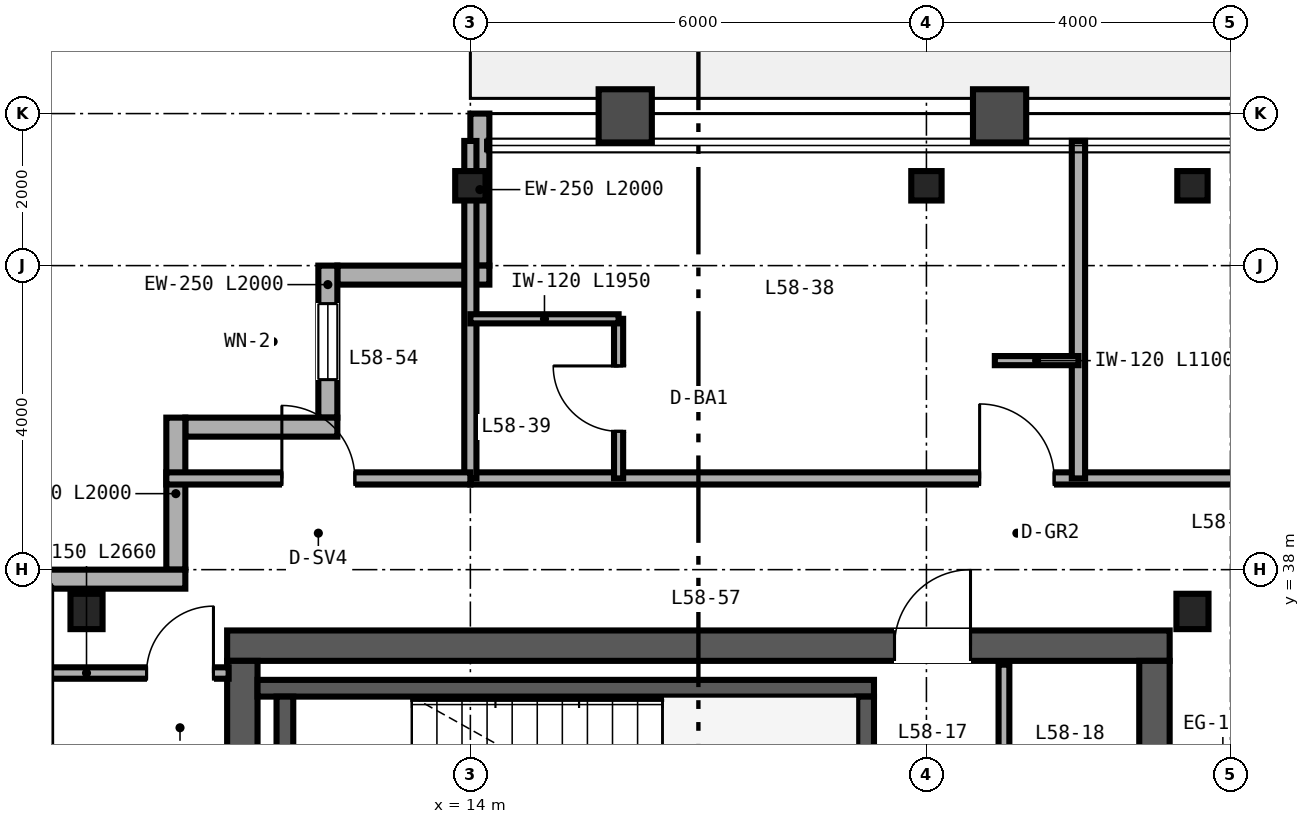
"""IFC4 building model, lengths in metres.
Left out: names, types, materials, properties, quantities, classifications, styles, units other than length and angle.
Written with IfcOpenShell. Run it as: python <this file> out.ifc"""

import sys

from ifc_helpers import new_model, si_unit, direction, frame, frame_2d, origin, origin_2d, place, context, subcontext, project, spatial, rectangle, i_section, extrude, source, transform, mapped, element, fill, save


model = new_model("IFC4")
c1 = context("Model", 3, precision=1e-05, world=origin(), true_north=direction((0.0, 1.0)))
c2 = subcontext(c1, "Body", "Model", "MODEL_VIEW")
j1 = project(units=[si_unit("LENGTHUNIT", "METRE"), si_unit("PLANEANGLEUNIT", "RADIAN")], contexts=[c1])
p1 = place(None, origin())
s1 = spatial("IfcSite", under=j1, at=p1, CompositionType="ELEMENT")
p2 = place(p1, origin())
s2 = spatial("IfcBuilding", under=s1, at=p2, CompositionType="ELEMENT")
p3 = place(p2, frame((0.0, 0.0, 232.8)))
s3 = spatial("IfcBuildingStorey", under=s2, at=p3, CompositionType="ELEMENT", Elevation=232.8)
p4 = place(p3, frame((10.8, 37.0, 0.0), z_axis=(0.0, 0.0, 1.0), x_axis=(1.0, 0.0, 0.0)))
e1 = element("IfcWall", 1, at=p4, inside=s3, PredefinedType="SHEAR", context=c2, shape_type="SweptSolid", body=[
    extrude(rectangle(XDim=12.4, YDim=0.4, at=frame_2d((6.2, 0.0))), origin(), (0.0, 0.0, 1.0), 3.38),
])
p5 = place(p4, frame((8.78, 0.0, 0.0)))
e2 = element("IfcOpeningElement", 2, at=p5, cuts=e1, PredefinedType="OPENING", context=c2, shape_type="SweptSolid", body=[
    extrude(rectangle(XDim=1.0, YDim=2.15, at=frame_2d((0.5, 1.075))), frame((0.0, 0.21, 0.0), z_axis=(0.0, -1.0, 0.0), x_axis=(1.0, 0.0, 0.0)), (0.0, 0.0, 1.0), 0.42),
])
for number, where, z_axis, x_axis in (
    (3, (11.0, 15.2, 0.0), (0.0, 0.0, 1.0), (0.0, 1.0, 0.0)),
    (4, (23.0, 15.2, 0.0), (0.0, 0.0, 1.0), (0.0, 1.0, 0.0)),
):
    element("IfcWall", number, at=place(p3, frame(where, z_axis=z_axis, x_axis=x_axis)), inside=s3, PredefinedType="SHEAR", context=c2, shape_type="SweptSolid", body=[
        extrude(rectangle(XDim=21.6, YDim=0.4, at=frame_2d((10.8, 0.0))), origin(), (0.0, 0.0, 1.0), 3.38),
    ])
p6 = place(p3, frame((11.2, 36.44, 0.0), z_axis=(0.0, 0.0, 1.0), x_axis=(1.0, 0.0, 0.0)))
e5 = element("IfcWall", 5, at=p6, inside=s3, PredefinedType="SHEAR", context=c2, shape_type="SweptSolid", body=[
    extrude(rectangle(XDim=8.11, YDim=0.22, at=frame_2d((4.055, 0.0))), origin(), (0.0, 0.0, 1.0), 3.4),
])
for number, where, z_axis, x_axis in (
    (6, (11.56, 33.05, 0.0), (0.0, 0.0, 1.0), (0.0, 1.0, 0.0)),
    (7, (19.2, 33.05, 0.0), (0.0, 0.0, 1.0), (0.0, 1.0, 0.0)),
):
    element("IfcWall", number, at=place(p3, frame(where, z_axis=z_axis, x_axis=x_axis)), inside=s3, PredefinedType="SHEAR", context=c2, shape_type="SweptSolid", body=[
        extrude(rectangle(XDim=3.28, YDim=0.22, at=frame_2d((1.64, 0.0))), origin(), (0.0, 0.0, 1.0), 3.4),
    ])
m1 = source(origin(), c2, "Body", "SweptSolid", [
    extrude(i_section(OverallWidth=0.422, OverallDepth=0.465, WebThickness=0.045, FlangeThickness=0.073, FilletRadius=0.025, at=origin_2d()), origin(), (0.0, 0.0, 1.0), 3.38),
])
for number, where, z_axis, x_axis in (
    (8, (8.95, 37.45, 0.0), (0.0, 0.0, 1.0), (1.0, 0.0, 0.0)),
    (9, (23.5, 37.45, 0.0), (0.0, 0.0, 1.0), (1.0, 0.0, 0.0)),
):
    element("IfcColumn", number, at=place(p3, frame(where, z_axis=z_axis, x_axis=x_axis)), inside=s3, PredefinedType="COLUMN", context=c2, shape_type="MappedRepresentation", body=[
        mapped(m1, transform((0.0, 0.0, 0.0), scale=1.0)),
    ])
m2 = source(origin(), c2, "Body", "SweptSolid", [
    extrude(i_section(OverallWidth=0.399, OverallDepth=0.387, WebThickness=0.021, FlangeThickness=0.033, FilletRadius=0.025, at=origin_2d()), origin(), (0.0, 0.0, 1.0), 3.38),
])
for number, where, z_axis, x_axis in (
    (10, (14.0, 43.05, 0.0), (0.0, 0.0, 1.0), (1.0, 0.0, 0.0)),
    (11, (20.0, 43.05, 0.0), (0.0, 0.0, 1.0), (1.0, 0.0, 0.0)),
    (12, (23.5, 43.05, 0.0), (0.0, 0.0, 1.0), (1.0, 0.0, 0.0)),
):
    element("IfcColumn", number, at=place(p3, frame(where, z_axis=z_axis, x_axis=x_axis)), inside=s3, PredefinedType="COLUMN", context=c2, shape_type="MappedRepresentation", body=[
        mapped(m2, transform((0.0, 0.0, 0.0), scale=1.0)),
    ])
p7 = place(p3, frame((14.125, 44.0, 0.0), z_axis=(0.0, 0.0, 1.0), x_axis=(0.0, -1.0, 0.0)))
e13 = element("IfcWall", 13, at=p7, inside=s3, PredefinedType="SOLIDWALL", context=c2, shape_type="SweptSolid", body=[
    extrude(rectangle(XDim=2.0, YDim=0.25, at=frame_2d((1.0, 0.0))), origin(), (0.0, 0.0, 1.0), 2.687),
])
p8 = place(p3, frame((14.25, 41.875, 0.0), z_axis=(0.0, 0.0, 1.0), x_axis=(-1.0, 0.0, 0.0)))
e14 = element("IfcWall", 14, at=p8, inside=s3, PredefinedType="SOLIDWALL", context=c2, shape_type="SweptSolid", body=[
    extrude(rectangle(XDim=2.0, YDim=0.25, at=frame_2d((1.0, 0.0))), origin(), (0.0, 0.0, 1.0), 3.38),
])
p9 = place(p3, frame((12.125, 42.0, 0.0), z_axis=(0.0, 0.0, 1.0), x_axis=(0.0, -1.0, 0.0)))
e15 = element("IfcWall", 15, at=p9, inside=s3, PredefinedType="SOLIDWALL", context=c2, shape_type="SweptSolid", body=[
    extrude(rectangle(XDim=2.0, YDim=0.25, at=frame_2d((1.0, 0.0))), origin(), (0.0, 0.0, 1.0), 3.38),
])
p10 = place(p9, frame((0.5, 0.0, 0.85)))
e16 = element("IfcOpeningElement", 16, at=p10, cuts=e15, PredefinedType="OPENING", context=c2, shape_type="SweptSolid", body=[
    extrude(rectangle(XDim=1.0, YDim=1.9, at=frame_2d((0.5, 0.95))), frame((0.0, 0.135, 0.0), z_axis=(0.0, -1.0, 0.0), x_axis=(1.0, 0.0, 0.0)), (0.0, 0.0, 1.0), 0.27),
])
for number, where, z_axis, x_axis in (
    (17, (12.25, 39.875, 0.0), (0.0, 0.0, 1.0), (-1.0, 0.0, 0.0)),
    (18, (10.125, 40.0, 0.0), (0.0, 0.0, 1.0), (0.0, -1.0, 0.0)),
):
    element("IfcWall", number, at=place(p3, frame(where, z_axis=z_axis, x_axis=x_axis)), inside=s3, PredefinedType="SOLIDWALL", context=c2, shape_type="SweptSolid", body=[
        extrude(rectangle(XDim=2.0, YDim=0.25, at=frame_2d((1.0, 0.0))), origin(), (0.0, 0.0, 1.0), 3.38),
    ])
p11 = place(p3, frame((10.25, 37.875, 0.0), z_axis=(0.0, 0.0, 1.0), x_axis=(-1.0, 0.0, 0.0)))
e19 = element("IfcWall", 19, at=p11, inside=s3, PredefinedType="SOLIDWALL", context=c2, shape_type="SweptSolid", body=[
    extrude(rectangle(XDim=2.25, YDim=0.25, at=frame_2d((1.125, 0.0))), origin(), (0.0, 0.0, 1.0), 3.38),
])
p12 = place(p3, frame((21.02, 33.28, 0.0), z_axis=(0.0, 0.0, 1.0), x_axis=(0.0, 1.0, 0.0)))
e20 = element("IfcWall", 20, at=p12, inside=s3, PredefinedType="PARTITIONING", context=c2, shape_type="SweptSolid", body=[
    extrude(rectangle(XDim=3.47, YDim=0.142, at=frame_2d((1.735, 0.0))), origin(), (0.0, 0.0, 1.0), 3.38),
])
p13 = place(p12, frame((1.15, 0.0, 0.0)))
e21 = element("IfcOpeningElement", 21, at=p13, cuts=e20, PredefinedType="OPENING", context=c2, shape_type="SweptSolid", body=[
    extrude(rectangle(XDim=0.84, YDim=2.1, at=frame_2d((0.42, 1.05))), frame((0.0, 0.081, 0.0), z_axis=(0.0, -1.0, 0.0), x_axis=(1.0, 0.0, 0.0)), (0.0, 0.0, 1.0), 0.162),
])
p14 = place(p3, frame((14.0, 39.2, 0.0), z_axis=(0.0, 0.0, 1.0), x_axis=(1.0, 0.0, 0.0)))
e22 = element("IfcWall", 22, at=p14, inside=s3, PredefinedType="PARTITIONING", context=c2, shape_type="SweptSolid", body=[
    extrude(rectangle(XDim=36.0, YDim=0.16, at=frame_2d((18.0, 0.0))), origin(), (0.0, 0.0, 1.0), 2.923),
])
p15 = place(p14, frame((6.7, 0.0, 0.0)))
e23 = element("IfcOpeningElement", 23, at=p15, cuts=e22, PredefinedType="OPENING", context=c2, shape_type="SweptSolid", body=[
    extrude(rectangle(XDim=0.98, YDim=2.2, at=frame_2d((0.49, 1.1))), frame((0.0, 0.09, 0.0), z_axis=(0.0, -1.0, 0.0), x_axis=(1.0, 0.0, 0.0)), (0.0, 0.0, 1.0), 0.18),
])
p16 = place(p14, frame((12.02, 0.0, 0.0)))
e24 = element("IfcOpeningElement", 24, at=p16, cuts=e22, PredefinedType="OPENING", context=c2, shape_type="SweptSolid", body=[
    extrude(rectangle(XDim=0.96, YDim=2.15, at=frame_2d((0.48, 1.075))), frame((0.0, 0.09, 0.0), z_axis=(0.0, -1.0, 0.0), x_axis=(1.0, 0.0, 0.0)), (0.0, 0.0, 1.0), 0.18),
])
p17 = place(p14, frame((25.2, 0.0, 0.0)))
e25 = element("IfcOpeningElement", 25, at=p17, cuts=e22, PredefinedType="OPENING", context=c2, shape_type="SweptSolid", body=[
    extrude(rectangle(XDim=0.98, YDim=2.2, at=frame_2d((0.49, 1.1))), frame((0.0, 0.09, 0.0), z_axis=(0.0, -1.0, 0.0), x_axis=(1.0, 0.0, 0.0)), (0.0, 0.0, 1.0), 0.18),
])
p18 = place(p14, frame((30.77, 0.0, 0.0)))
e26 = element("IfcOpeningElement", 26, at=p18, cuts=e22, PredefinedType="OPENING", context=c2, shape_type="SweptSolid", body=[
    extrude(rectangle(XDim=0.96, YDim=2.15, at=frame_2d((0.48, 1.075))), frame((0.0, 0.09, 0.0), z_axis=(0.0, -1.0, 0.0), x_axis=(1.0, 0.0, 0.0)), (0.0, 0.0, 1.0), 0.18),
])
p19 = place(p3, frame((14.0, 39.2, 0.0), z_axis=(0.0, 0.0, 1.0), x_axis=(0.0, 1.0, 0.0)))
e27 = element("IfcWall", 27, at=p19, inside=s3, PredefinedType="PARTITIONING", context=c2, shape_type="SweptSolid", body=[
    extrude(rectangle(XDim=4.44, YDim=0.16, at=frame_2d((2.22, 0.0))), origin(), (0.0, 0.0, 1.0), 2.687),
])
p20 = place(p3, frame((22.0, 39.2, 0.0), z_axis=(0.0, 0.0, 1.0), x_axis=(0.0, 1.0, 0.0)))
e28 = element("IfcWall", 28, at=p20, inside=s3, PredefinedType="PARTITIONING", context=c2, shape_type="SweptSolid", body=[
    extrude(rectangle(XDim=4.44, YDim=0.175, at=frame_2d((2.22, 0.0))), origin(), (0.0, 0.0, 1.0), 2.843),
])
p21 = place(p3, frame((15.95, 39.2, 0.0), z_axis=(0.0, 0.0, 1.0), x_axis=(0.0, 1.0, 0.0)))
e29 = element("IfcWall", 29, at=p21, inside=s3, PredefinedType="PARTITIONING", context=c2, shape_type="SweptSolid", body=[
    extrude(rectangle(XDim=2.1, YDim=0.12, at=frame_2d((1.05, 0.0))), origin(), (0.0, 0.0, 1.0), 3.38),
])
p22 = place(p21, frame((0.62, 0.0, 0.0)))
e30 = element("IfcOpeningElement", 30, at=p22, cuts=e29, PredefinedType="OPENING", context=c2, shape_type="SweptSolid", body=[
    extrude(rectangle(XDim=0.86, YDim=2.1, at=frame_2d((0.43, 1.05))), frame((0.0, 0.07, 0.0), z_axis=(0.0, -1.0, 0.0), x_axis=(1.0, 0.0, 0.0)), (0.0, 0.0, 1.0), 0.14),
])
p23 = place(p3, frame((14.0, 41.3, 0.0), z_axis=(0.0, 0.0, 1.0), x_axis=(1.0, 0.0, 0.0)))
e31 = element("IfcWall", 31, at=p23, inside=s3, PredefinedType="PARTITIONING", context=c2, shape_type="SweptSolid", body=[
    extrude(rectangle(XDim=1.95, YDim=0.12, at=frame_2d((0.975, 0.0))), origin(), (0.0, 0.0, 1.0), 3.38),
])
p24 = place(p3, frame((20.9, 40.75, 0.0), z_axis=(0.0, 0.0, 1.0), x_axis=(1.0, 0.0, 0.0)))
e32 = element("IfcWall", 32, at=p24, inside=s3, PredefinedType="PARTITIONING", context=c2, shape_type="SweptSolid", body=[
    extrude(rectangle(XDim=1.1, YDim=0.12, at=frame_2d((0.55, 0.0))), origin(), (0.0, 0.0, 1.0), 3.38),
])
p25 = place(p3, frame((8.16, 36.64, 0.0), z_axis=(0.0, 0.0, 1.0), x_axis=(1.0, 0.0, 0.0)))
e33 = element("IfcWall", 33, at=p25, inside=s3, PredefinedType="PARTITIONING", context=c2, shape_type="SweptSolid", body=[
    extrude(rectangle(XDim=2.66, YDim=0.15, at=frame_2d((1.33, 0.0))), origin(), (0.0, 0.0, 1.0), 2.763),
])
p26 = place(p25, frame((1.58, 0.0, 0.0)))
e34 = element("IfcOpeningElement", 34, at=p26, cuts=e33, PredefinedType="OPENING", context=c2, shape_type="SweptSolid", body=[
    extrude(rectangle(XDim=0.88, YDim=2.15, at=frame_2d((0.44, 1.075))), frame((0.0, 0.085, 0.0), z_axis=(0.0, -1.0, 0.0), x_axis=(1.0, 0.0, 0.0)), (0.0, 0.0, 1.0), 0.17),
])
p27 = place(p3, frame((10.0, 39.2, 0.0), z_axis=(0.0, 0.0, 1.0), x_axis=(1.0, 0.0, 0.0)))
e35 = element("IfcWall", 35, at=p27, inside=s3, PredefinedType="PARTITIONING", context=c2, shape_type="SweptSolid", body=[
    extrude(rectangle(XDim=4.0, YDim=0.16, at=frame_2d((2.0, 0.0))), origin(), (0.0, 0.0, 1.0), 3.38),
])
p28 = place(p27, frame((1.52, 0.0, 0.0)))
e36 = element("IfcOpeningElement", 36, at=p28, cuts=e35, PredefinedType="OPENING", context=c2, shape_type="SweptSolid", body=[
    extrude(rectangle(XDim=0.96, YDim=2.15, at=frame_2d((0.48, 1.075))), frame((0.0, 0.09, 0.0), z_axis=(0.0, -1.0, 0.0), x_axis=(1.0, 0.0, 0.0)), (0.0, 0.0, 1.0), 0.18),
])
m3 = source(origin(), c2, "Body", "SweptSolid", [
    extrude(rectangle(XDim=1.0, YDim=1.9, at=frame_2d((0.5, 0.95))), frame((0.0, 0.03, 0.0), z_axis=(0.0, -1.0, 0.0), x_axis=(1.0, 0.0, 0.0)), (0.0, 0.0, 1.0), 0.06),
])
p29 = place(p10, origin())
e37 = element("IfcWindow", 37, at=p29, inside=s3, PartitioningType="SINGLE_PANEL", PredefinedType="WINDOW", context=c2, shape_type="MappedRepresentation", body=[
    mapped(m3, transform((0.0, 0.0, 0.0), scale=1.0)),
])
fill(e16, e37)
m4 = source(origin(), c2, "Body", "SweptSolid", [
    extrude(rectangle(XDim=1.0, YDim=2.15, at=frame_2d((0.5, 1.075))), frame((0.0, 0.025, 0.0), z_axis=(0.0, -1.0, 0.0), x_axis=(1.0, 0.0, 0.0)), (0.0, 0.0, 1.0), 0.05),
])
p30 = place(p5, origin())
e38 = element("IfcDoor", 38, at=p30, inside=s3, OperationType="SINGLE_SWING_RIGHT", PredefinedType="DOOR", context=c2, shape_type="MappedRepresentation", body=[
    mapped(m4, transform((0.0, 0.0, 0.0), scale=1.0)),
])
fill(e2, e38)
m5 = source(origin(), c2, "Body", "SweptSolid", [
    extrude(rectangle(XDim=0.86, YDim=2.1, at=frame_2d((0.43, 1.05))), frame((0.0, 0.025, 0.0), z_axis=(0.0, -1.0, 0.0), x_axis=(1.0, 0.0, 0.0)), (0.0, 0.0, 1.0), 0.05),
])
p31 = place(p22, origin())
e39 = element("IfcDoor", 39, at=p31, inside=s3, OperationType="SINGLE_SWING_RIGHT", PredefinedType="DOOR", context=c2, shape_type="MappedRepresentation", body=[
    mapped(m5, transform((0.0, 0.0, 0.0), scale=1.0)),
])
fill(e30, e39)
m6 = source(origin(), c2, "Body", "SweptSolid", [
    extrude(rectangle(XDim=0.98, YDim=2.2, at=frame_2d((0.49, 1.1))), frame((0.0, 0.025, 0.0), z_axis=(0.0, -1.0, 0.0), x_axis=(1.0, 0.0, 0.0)), (0.0, 0.0, 1.0), 0.05),
])
p32 = place(p15, origin())
e40 = element("IfcDoor", 40, at=p32, inside=s3, OperationType="SINGLE_SWING_LEFT", PredefinedType="DOOR", context=c2, shape_type="MappedRepresentation", body=[
    mapped(m6, transform((0.0, 0.0, 0.0), scale=1.0)),
])
fill(e23, e40)
m7 = source(origin(), c2, "Body", "SweptSolid", [
    extrude(rectangle(XDim=0.88, YDim=2.15, at=frame_2d((0.44, 1.075))), frame((0.0, 0.025, 0.0), z_axis=(0.0, -1.0, 0.0), x_axis=(1.0, 0.0, 0.0)), (0.0, 0.0, 1.0), 0.05),
])
p33 = place(p26, origin())
e41 = element("IfcDoor", 41, at=p33, inside=s3, OperationType="SINGLE_SWING_RIGHT", PredefinedType="DOOR", context=c2, shape_type="MappedRepresentation", body=[
    mapped(m7, transform((0.0, 0.0, 0.0), scale=1.0)),
])
fill(e34, e41)
m8 = source(origin(), c2, "Body", "SweptSolid", [
    extrude(rectangle(XDim=0.96, YDim=2.15, at=frame_2d((0.48, 1.075))), frame((0.0, 0.025, 0.0), z_axis=(0.0, -1.0, 0.0), x_axis=(1.0, 0.0, 0.0)), (0.0, 0.0, 1.0), 0.05),
])
p34 = place(p28, origin())
e42 = element("IfcDoor", 42, at=p34, inside=s3, OperationType="SINGLE_SWING_LEFT", PredefinedType="DOOR", context=c2, shape_type="MappedRepresentation", body=[
    mapped(m8, transform((0.0, 0.0, 0.0), scale=1.0)),
])
fill(e36, e42)
save(model, sys.argv[1])
